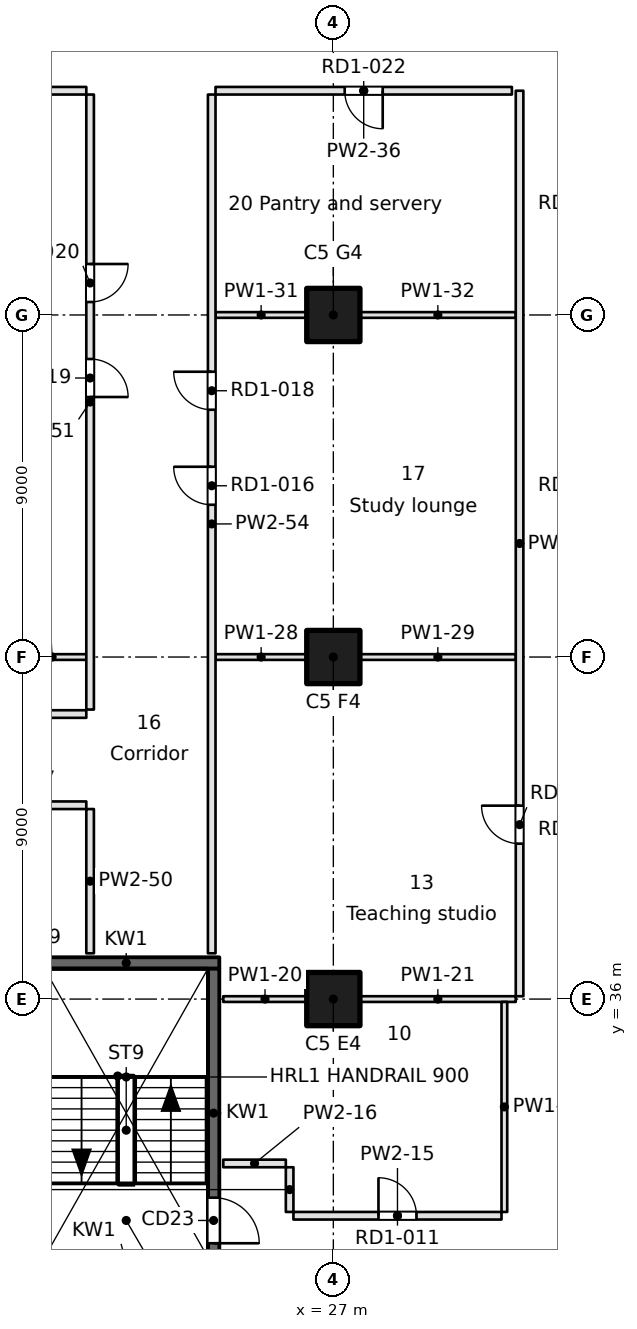
"""IFC4 building model, lengths in metres.
Left out: names, types, materials, properties, quantities, classifications, styles, units other than length and angle.
Written with IfcOpenShell. Run it as: python <this file> out.ifc"""

import sys

from ifc_helpers import new_model, si_unit, direction, frame, frame_2d, origin, origin_2d, place, context, subcontext, project, spatial, rectangle, extrude, element, fill, save


model = new_model("IFC4")
c1 = context("Model", 3, precision=1e-05, world=origin(), true_north=direction((0.0, 1.0)))
c2 = subcontext(c1, "Body", "Model", "MODEL_VIEW")
j1 = project(units=[si_unit("LENGTHUNIT", "METRE"), si_unit("PLANEANGLEUNIT", "RADIAN")], contexts=[c1])
p1 = place(None, origin())
s1 = spatial("IfcSite", under=j1, at=p1, CompositionType="ELEMENT")
p2 = place(p1, origin())
s2 = spatial("IfcBuilding", under=s1, at=p2, CompositionType="ELEMENT")
p3 = place(p2, frame((0.0, 0.0, 58.0)))
s3 = spatial("IfcBuildingStorey", under=s2, at=p3, CompositionType="ELEMENT", Elevation=58.0)
for number, where, z_axis, x_axis in (
    (1, (27.0, 36.0, 0.0), (0.0, 0.0, 1.0), (1.0, 0.0, 0.0)),
    (2, (27.0, 45.0, 0.0), (0.0, 0.0, 1.0), (1.0, 0.0, 0.0)),
    (3, (27.0, 54.0, 0.0), (0.0, 0.0, 1.0), (1.0, 0.0, 0.0)),
):
    element("IfcColumn", number, at=place(p3, frame(where, z_axis=z_axis, x_axis=x_axis)), inside=s3, PredefinedType="COLUMN", context=c2, shape_type="SweptSolid", body=[
        extrude(rectangle(XDim=1.4, YDim=1.4, at=origin_2d()), origin(), (0.0, 0.0, 1.0), 3.7),
    ])
p4 = place(p3, frame((19.1, 36.95, -0.4), z_axis=(0.0, 0.0, 1.0), x_axis=(1.0, 0.0, 0.0)))
e4 = element("IfcWall", 4, at=p4, inside=s3, PredefinedType="SOLIDWALL", context=c2, shape_type="SweptSolid", body=[
    extrude(rectangle(XDim=4.9, YDim=0.3, at=frame_2d((2.45, 0.0))), origin(), (0.0, 0.0, 1.0), 3.7),
])
p5 = place(p3, frame((23.85, 29.2, -0.4), z_axis=(0.0, 0.0, 1.0), x_axis=(0.0, 1.0, 0.0)))
e5 = element("IfcWall", 5, at=p5, inside=s3, PredefinedType="SOLIDWALL", context=c2, shape_type="SweptSolid", body=[
    extrude(rectangle(XDim=7.6, YDim=0.3, at=frame_2d((3.8, 0.0))), origin(), (0.0, 0.0, 1.0), 3.7),
])
p6 = place(p5, frame((0.375, 0.0, 0.4)))
e6 = element("IfcOpeningElement", 6, at=p6, cuts=e5, PredefinedType="OPENING", context=c2, shape_type="SweptSolid", body=[
    extrude(rectangle(XDim=1.2, YDim=2.1, at=frame_2d((0.6, 1.05))), frame((0.0, 0.15, 0.0), z_axis=(0.0, -1.0, 0.0), x_axis=(1.0, 0.0, 0.0)), (0.0, 0.0, 1.0), 0.3),
])
p7 = place(p3, frame((25.95, 30.299, 0.0), z_axis=(0.0, 0.0, 1.0), x_axis=(1.0, 0.0, 0.0)))
e7 = element("IfcWall", 7, at=p7, inside=s3, PredefinedType="PARTITIONING", context=c2, shape_type="SweptSolid", body=[
    extrude(rectangle(XDim=5.475, YDim=0.2, at=frame_2d((2.738, 0.0))), origin(), (0.0, 0.0, 1.0), 3.3),
])
p8 = place(p7, frame((2.238, 0.0, 0.0)))
e8 = element("IfcOpeningElement", 8, at=p8, cuts=e7, PredefinedType="OPENING", context=c2, shape_type="SweptSolid", body=[
    extrude(rectangle(XDim=1.0, YDim=2.1, at=frame_2d((0.5, 1.05))), frame((0.0, 0.1, 0.0), z_axis=(0.0, -1.0, 0.0), x_axis=(1.0, 0.0, 0.0)), (0.0, 0.0, 1.0), 0.2),
])
p9 = place(p3, frame((24.104, 31.675, 0.0), z_axis=(0.0, 0.0, 1.0), x_axis=(1.0, 0.0, 0.0)))
e9 = element("IfcWall", 9, at=p9, inside=s3, PredefinedType="PARTITIONING", context=c2, shape_type="SweptSolid", body=[
    extrude(rectangle(XDim=1.646, YDim=0.2, at=frame_2d((0.823, 0.0))), origin(), (0.0, 0.0, 1.0), 3.3),
])
p10 = place(p3, frame((24.104, 36.0, 0.0), z_axis=(0.0, 0.0, 1.0), x_axis=(1.0, 0.0, 0.0)))
e10 = element("IfcWall", 10, at=p10, inside=s3, PredefinedType="PARTITIONING", context=c2, shape_type="SweptSolid", body=[
    extrude(rectangle(XDim=2.196, YDim=0.15, at=frame_2d((1.098, 0.0))), origin(), (0.0, 0.0, 1.0), 3.3),
])
p11 = place(p3, frame((27.7, 36.0, 0.0), z_axis=(0.0, 0.0, 1.0), x_axis=(1.0, 0.0, 0.0)))
e11 = element("IfcWall", 11, at=p11, inside=s3, PredefinedType="PARTITIONING", context=c2, shape_type="SweptSolid", body=[
    extrude(rectangle(XDim=4.1, YDim=0.15, at=frame_2d((2.05, 0.0))), origin(), (0.0, 0.0, 1.0), 3.3),
])
p12 = place(p3, frame((20.5, 41.1, 0.0), z_axis=(0.0, 0.0, 1.0), x_axis=(-1.0, 0.0, 0.0)))
e12 = element("IfcWall", 12, at=p12, inside=s3, PredefinedType="PARTITIONING", context=c2, shape_type="SweptSolid", body=[
    extrude(rectangle(XDim=11.425, YDim=0.2, at=frame_2d((5.712, 0.0))), origin(), (0.0, 0.0, 1.0), 3.3),
])
p13 = place(p12, frame((4.812, 0.0, 0.0)))
e13 = element("IfcOpeningElement", 13, at=p13, cuts=e12, PredefinedType="OPENING", context=c2, shape_type="SweptSolid", body=[
    extrude(rectangle(XDim=1.8, YDim=2.1, at=frame_2d((0.9, 1.05))), frame((0.0, 0.1, 0.0), z_axis=(0.0, -1.0, 0.0), x_axis=(1.0, 0.0, 0.0)), (0.0, 0.0, 1.0), 0.2),
])
p14 = place(p3, frame((6.1, 43.5, 0.0), z_axis=(0.0, 0.0, 1.0), x_axis=(1.0, 0.0, 0.0)))
e14 = element("IfcWall", 14, at=p14, inside=s3, PredefinedType="PARTITIONING", context=c2, shape_type="SweptSolid", body=[
    extrude(rectangle(XDim=14.4, YDim=0.2, at=frame_2d((7.2, 0.0))), origin(), (0.0, 0.0, 1.0), 3.3),
])
p15 = place(p14, frame((6.3, 0.0, 0.0)))
e15 = element("IfcOpeningElement", 15, at=p15, cuts=e14, PredefinedType="OPENING", context=c2, shape_type="SweptSolid", body=[
    extrude(rectangle(XDim=1.8, YDim=2.1, at=frame_2d((0.9, 1.05))), frame((0.0, 0.1, 0.0), z_axis=(0.0, -1.0, 0.0), x_axis=(1.0, 0.0, 0.0)), (0.0, 0.0, 1.0), 0.2),
])
p16 = place(p3, frame((18.7, 45.0, 0.0), z_axis=(0.0, 0.0, 1.0), x_axis=(1.0, 0.0, 0.0)))
e16 = element("IfcWall", 16, at=p16, inside=s3, PredefinedType="PARTITIONING", context=c2, shape_type="SweptSolid", body=[
    extrude(rectangle(XDim=1.8, YDim=0.15, at=frame_2d((0.9, 0.0))), origin(), (0.0, 0.0, 1.0), 3.3),
])
p17 = place(p3, frame((23.9, 45.0, 0.0), z_axis=(0.0, 0.0, 1.0), x_axis=(1.0, 0.0, 0.0)))
e17 = element("IfcWall", 17, at=p17, inside=s3, PredefinedType="PARTITIONING", context=c2, shape_type="SweptSolid", body=[
    extrude(rectangle(XDim=2.4, YDim=0.15, at=frame_2d((1.2, 0.0))), origin(), (0.0, 0.0, 1.0), 3.3),
])
p18 = place(p3, frame((27.7, 45.0, 0.0), z_axis=(0.0, 0.0, 1.0), x_axis=(1.0, 0.0, 0.0)))
e18 = element("IfcWall", 18, at=p18, inside=s3, PredefinedType="PARTITIONING", context=c2, shape_type="SweptSolid", body=[
    extrude(rectangle(XDim=4.1, YDim=0.15, at=frame_2d((2.05, 0.0))), origin(), (0.0, 0.0, 1.0), 3.3),
])
p19 = place(p3, frame((23.9, 54.0, 0.0), z_axis=(0.0, 0.0, 1.0), x_axis=(1.0, 0.0, 0.0)))
e19 = element("IfcWall", 19, at=p19, inside=s3, PredefinedType="PARTITIONING", context=c2, shape_type="SweptSolid", body=[
    extrude(rectangle(XDim=2.4, YDim=0.15, at=frame_2d((1.2, 0.0))), origin(), (0.0, 0.0, 1.0), 3.3),
])
p20 = place(p3, frame((27.7, 54.0, 0.0), z_axis=(0.0, 0.0, 1.0), x_axis=(1.0, 0.0, 0.0)))
e20 = element("IfcWall", 20, at=p20, inside=s3, PredefinedType="PARTITIONING", context=c2, shape_type="SweptSolid", body=[
    extrude(rectangle(XDim=4.1, YDim=0.15, at=frame_2d((2.05, 0.0))), origin(), (0.0, 0.0, 1.0), 3.3),
])
p21 = place(p3, frame((20.5, 59.9, 0.0), z_axis=(0.0, 0.0, 1.0), x_axis=(-1.0, 0.0, 0.0)))
e21 = element("IfcWall", 21, at=p21, inside=s3, PredefinedType="PARTITIONING", context=c2, shape_type="SweptSolid", body=[
    extrude(rectangle(XDim=11.596, YDim=0.2, at=frame_2d((5.798, 0.0))), origin(), (0.0, 0.0, 1.0), 3.3),
])
p22 = place(p3, frame((31.698, 59.9, 0.0), z_axis=(0.0, 0.0, 1.0), x_axis=(-1.0, 0.0, 0.0)))
e22 = element("IfcWall", 22, at=p22, inside=s3, PredefinedType="PARTITIONING", context=c2, shape_type="SweptSolid", body=[
    extrude(rectangle(XDim=7.798, YDim=0.2, at=frame_2d((3.899, 0.0))), origin(), (0.0, 0.0, 1.0), 3.3),
])
p23 = place(p22, frame((3.399, 0.0, 0.0)))
e23 = element("IfcOpeningElement", 23, at=p23, cuts=e22, PredefinedType="OPENING", context=c2, shape_type="SweptSolid", body=[
    extrude(rectangle(XDim=1.0, YDim=2.1, at=frame_2d((0.5, 1.05))), frame((0.0, 0.1, 0.0), z_axis=(0.0, -1.0, 0.0), x_axis=(1.0, 0.0, 0.0)), (0.0, 0.0, 1.0), 0.2),
])
p24 = place(p3, frame((20.6, 37.204, 0.0), z_axis=(0.0, 0.0, 1.0), x_axis=(0.0, 1.0, 0.0)))
e24 = element("IfcWall", 24, at=p24, inside=s3, PredefinedType="PARTITIONING", context=c2, shape_type="SweptSolid", body=[
    extrude(rectangle(XDim=3.796, YDim=0.2, at=frame_2d((1.898, 0.0))), origin(), (0.0, 0.0, 1.0), 3.3),
])
p25 = place(p3, frame((20.6, 43.618, 0.0), z_axis=(0.0, 0.0, 1.0), x_axis=(0.0, 1.0, 0.0)))
e25 = element("IfcWall", 25, at=p25, inside=s3, PredefinedType="PARTITIONING", context=c2, shape_type="SweptSolid", body=[
    extrude(rectangle(XDim=16.182, YDim=0.2, at=frame_2d((8.091, 0.0))), origin(), (0.0, 0.0, 1.0), 3.3),
])
p26 = place(p25, frame((8.223, 0.0, 0.0)))
e26 = element("IfcOpeningElement", 26, at=p26, cuts=e25, PredefinedType="OPENING", context=c2, shape_type="SweptSolid", body=[
    extrude(rectangle(XDim=1.0, YDim=2.1, at=frame_2d((0.5, 1.05))), frame((0.0, 0.1, 0.0), z_axis=(0.0, -1.0, 0.0), x_axis=(1.0, 0.0, 0.0)), (0.0, 0.0, 1.0), 0.2),
])
p27 = place(p25, frame((10.723, 0.0, 0.0)))
e27 = element("IfcOpeningElement", 27, at=p27, cuts=e25, PredefinedType="OPENING", context=c2, shape_type="SweptSolid", body=[
    extrude(rectangle(XDim=1.0, YDim=2.1, at=frame_2d((0.5, 1.05))), frame((0.0, 0.1, 0.0), z_axis=(0.0, -1.0, 0.0), x_axis=(1.0, 0.0, 0.0)), (0.0, 0.0, 1.0), 0.2),
])
p28 = place(p3, frame((23.8, 59.8, 0.0), z_axis=(0.0, 0.0, 1.0), x_axis=(0.0, -1.0, 0.0)))
e28 = element("IfcWall", 28, at=p28, inside=s3, PredefinedType="PARTITIONING", context=c2, shape_type="SweptSolid", body=[
    extrude(rectangle(XDim=22.596, YDim=0.2, at=frame_2d((11.298, 0.0))), origin(), (0.0, 0.0, 1.0), 3.3),
])
p29 = place(p28, frame((9.794, 0.0, 0.0)))
e29 = element("IfcOpeningElement", 29, at=p29, cuts=e28, PredefinedType="OPENING", context=c2, shape_type="SweptSolid", body=[
    extrude(rectangle(XDim=1.0, YDim=2.1, at=frame_2d((0.5, 1.05))), frame((0.0, 0.1, 0.0), z_axis=(0.0, -1.0, 0.0), x_axis=(1.0, 0.0, 0.0)), (0.0, 0.0, 1.0), 0.2),
])
p30 = place(p28, frame((7.294, 0.0, 0.0)))
e30 = element("IfcOpeningElement", 30, at=p30, cuts=e28, PredefinedType="OPENING", context=c2, shape_type="SweptSolid", body=[
    extrude(rectangle(XDim=1.0, YDim=2.1, at=frame_2d((0.5, 1.05))), frame((0.0, 0.1, 0.0), z_axis=(0.0, -1.0, 0.0), x_axis=(1.0, 0.0, 0.0)), (0.0, 0.0, 1.0), 0.2),
])
p31 = place(p3, frame((25.85, 31.575, 0.0), z_axis=(0.0, 0.0, 1.0), x_axis=(0.0, -1.0, 0.0)))
e31 = element("IfcWall", 31, at=p31, inside=s3, PredefinedType="PARTITIONING", context=c2, shape_type="SweptSolid", body=[
    extrude(rectangle(XDim=1.176, YDim=0.2, at=frame_2d((0.588, 0.0))), origin(), (0.0, 0.0, 1.0), 3.3),
])
p32 = place(p3, frame((31.5, 35.925, 0.0), z_axis=(0.0, 0.0, 1.0), x_axis=(0.0, -1.0, 0.0)))
e32 = element("IfcWall", 32, at=p32, inside=s3, PredefinedType="PARTITIONING", context=c2, shape_type="SweptSolid", body=[
    extrude(rectangle(XDim=5.526, YDim=0.15, at=frame_2d((2.763, 0.0))), origin(), (0.0, 0.0, 1.0), 3.3),
])
p33 = place(p3, frame((31.9, 36.075, 0.0), z_axis=(0.0, 0.0, 1.0), x_axis=(0.0, 1.0, 0.0)))
e33 = element("IfcWall", 33, at=p33, inside=s3, PredefinedType="PARTITIONING", context=c2, shape_type="SweptSolid", body=[
    extrude(rectangle(XDim=23.825, YDim=0.2, at=frame_2d((11.913, 0.0))), origin(), (0.0, 0.0, 1.0), 3.3),
])
p34 = place(p33, frame((4.014, 0.0, 0.0)))
e34 = element("IfcOpeningElement", 34, at=p34, cuts=e33, PredefinedType="OPENING", context=c2, shape_type="SweptSolid", body=[
    extrude(rectangle(XDim=1.0, YDim=2.1, at=frame_2d((0.5, 1.05))), frame((0.0, 0.1, 0.0), z_axis=(0.0, -1.0, 0.0), x_axis=(1.0, 0.0, 0.0)), (0.0, 0.0, 1.0), 0.2),
])
p35 = place(p6, frame((1.2, 0.0, 0.0), z_axis=(0.0, 0.0, 1.0), x_axis=(-1.0, 0.0, 0.0)))
e35 = element("IfcDoor", 35, at=p35, inside=s3, OperationType="SINGLE_SWING_RIGHT", PredefinedType="DOOR", context=c2, shape_type="SweptSolid", body=[
    extrude(rectangle(XDim=1.2, YDim=2.1, at=frame_2d((0.6, 1.05))), frame((0.0, 0.025, 0.0), z_axis=(0.0, -1.0, 0.0), x_axis=(1.0, 0.0, 0.0)), (0.0, 0.0, 1.0), 0.05),
])
fill(e6, e35)
p36 = place(p8, origin())
e36 = element("IfcDoor", 36, at=p36, inside=s3, OperationType="SINGLE_SWING_LEFT", PredefinedType="DOOR", context=c2, shape_type="SweptSolid", body=[
    extrude(rectangle(XDim=1.0, YDim=2.1, at=frame_2d((0.5, 1.05))), frame((0.0, 0.025, 0.0), z_axis=(0.0, -1.0, 0.0), x_axis=(1.0, 0.0, 0.0)), (0.0, 0.0, 1.0), 0.05),
])
fill(e8, e36)
p37 = place(p34, origin())
e37 = element("IfcDoor", 37, at=p37, inside=s3, OperationType="SINGLE_SWING_RIGHT", PredefinedType="DOOR", context=c2, shape_type="SweptSolid", body=[
    extrude(rectangle(XDim=1.0, YDim=2.1, at=frame_2d((0.5, 1.05))), frame((0.0, 0.025, 0.0), z_axis=(0.0, -1.0, 0.0), x_axis=(1.0, 0.0, 0.0)), (0.0, 0.0, 1.0), 0.05),
])
fill(e34, e37)
p38 = place(p29, frame((1.0, 0.0, 0.0), z_axis=(0.0, 0.0, 1.0), x_axis=(-1.0, 0.0, 0.0)))
e38 = element("IfcDoor", 38, at=p38, inside=s3, OperationType="SINGLE_SWING_RIGHT", PredefinedType="DOOR", context=c2, shape_type="SweptSolid", body=[
    extrude(rectangle(XDim=1.0, YDim=2.1, at=frame_2d((0.5, 1.05))), frame((0.0, 0.025, 0.0), z_axis=(0.0, -1.0, 0.0), x_axis=(1.0, 0.0, 0.0)), (0.0, 0.0, 1.0), 0.05),
])
fill(e29, e38)
p39 = place(p30, frame((1.0, 0.0, 0.0), z_axis=(0.0, 0.0, 1.0), x_axis=(-1.0, 0.0, 0.0)))
e39 = element("IfcDoor", 39, at=p39, inside=s3, OperationType="SINGLE_SWING_RIGHT", PredefinedType="DOOR", context=c2, shape_type="SweptSolid", body=[
    extrude(rectangle(XDim=1.0, YDim=2.1, at=frame_2d((0.5, 1.05))), frame((0.0, 0.025, 0.0), z_axis=(0.0, -1.0, 0.0), x_axis=(1.0, 0.0, 0.0)), (0.0, 0.0, 1.0), 0.05),
])
fill(e30, e39)
p40 = place(p26, frame((1.0, 0.0, 0.0), z_axis=(0.0, 0.0, 1.0), x_axis=(-1.0, 0.0, 0.0)))
e40 = element("IfcDoor", 40, at=p40, inside=s3, OperationType="SINGLE_SWING_RIGHT", PredefinedType="DOOR", context=c2, shape_type="SweptSolid", body=[
    extrude(rectangle(XDim=1.0, YDim=2.1, at=frame_2d((0.5, 1.05))), frame((0.0, 0.025, 0.0), z_axis=(0.0, -1.0, 0.0), x_axis=(1.0, 0.0, 0.0)), (0.0, 0.0, 1.0), 0.05),
])
fill(e26, e40)
p41 = place(p27, frame((1.0, 0.0, 0.0), z_axis=(0.0, 0.0, 1.0), x_axis=(-1.0, 0.0, 0.0)))
e41 = element("IfcDoor", 41, at=p41, inside=s3, OperationType="SINGLE_SWING_LEFT", PredefinedType="DOOR", context=c2, shape_type="SweptSolid", body=[
    extrude(rectangle(XDim=1.0, YDim=2.1, at=frame_2d((0.5, 1.05))), frame((0.0, 0.025, 0.0), z_axis=(0.0, -1.0, 0.0), x_axis=(1.0, 0.0, 0.0)), (0.0, 0.0, 1.0), 0.05),
])
fill(e27, e41)
p42 = place(p23, origin())
e42 = element("IfcDoor", 42, at=p42, inside=s3, OperationType="SINGLE_SWING_LEFT", PredefinedType="DOOR", context=c2, shape_type="SweptSolid", body=[
    extrude(rectangle(XDim=1.0, YDim=2.1, at=frame_2d((0.5, 1.05))), frame((0.0, 0.025, 0.0), z_axis=(0.0, -1.0, 0.0), x_axis=(1.0, 0.0, 0.0)), (0.0, 0.0, 1.0), 0.05),
])
fill(e23, e42)
save(model, sys.argv[1])
